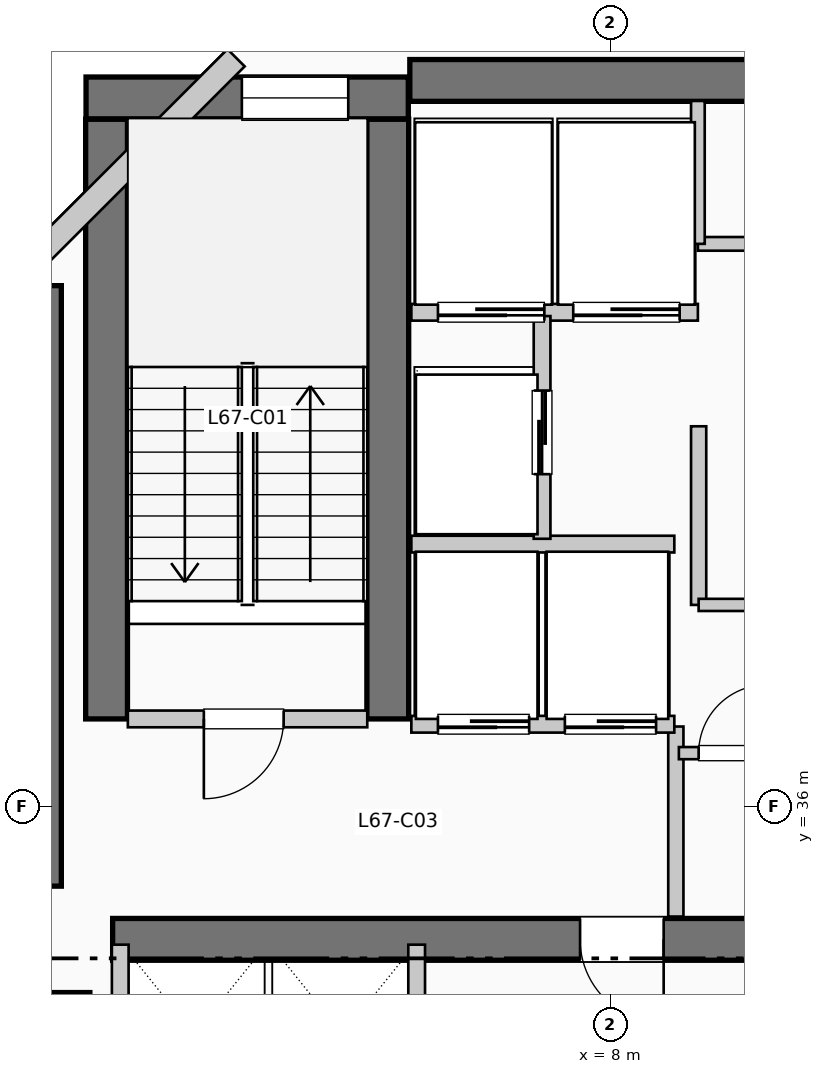
"""IFC4 building model, lengths in metres.
Left out: names, types, materials, properties, quantities, classifications, styles, units other than length and angle.
Written with IfcOpenShell. Run it as: python <this file> out.ifc"""

import sys

from ifc_helpers import new_model, si_unit, direction, frame, frame_2d, origin, origin_2d, place, context, subcontext, project, spatial, rectangle, extrude, element, fill, save


model = new_model("IFC4")
c1 = context("Model", 3, precision=1e-05, world=origin(), true_north=direction((0.0, 1.0)))
c2 = subcontext(c1, "Body", "Model", "MODEL_VIEW")
j1 = project(units=[si_unit("LENGTHUNIT", "METRE"), si_unit("PLANEANGLEUNIT", "RADIAN")], contexts=[c1])
p1 = place(None, origin())
s1 = spatial("IfcSite", under=j1, at=p1, CompositionType="ELEMENT")
p2 = place(p1, origin())
s2 = spatial("IfcBuilding", under=s1, at=p2, CompositionType="ELEMENT")
p3 = place(p2, frame((0.0, 0.0, 276.21)))
s3 = spatial("IfcBuildingStorey", under=s2, at=p3, CompositionType="ELEMENT", Elevation=276.21)
p4 = place(p3, frame((5.36, 45.55, 0.0), z_axis=(0.0, 0.0, 1.0), x_axis=(1.0, 0.0, 0.0)))
e1 = element("IfcWall", 1, at=p4, inside=s3, PredefinedType="SHEAR", context=c2, shape_type="SweptSolid", body=[
    extrude(rectangle(XDim=13.98, YDim=0.55, at=frame_2d((6.99, 0.0))), origin(), (0.0, 0.0, 1.0), 3.96),
])
p5 = place(p3, frame((0.5, 34.95, 0.0), z_axis=(0.0, 0.0, 1.0), x_axis=(0.0, 1.0, 0.0)))
e2 = element("IfcWall", 2, at=p5, inside=s3, PredefinedType="SHEAR", context=c2, shape_type="SweptSolid", body=[
    extrude(rectangle(XDim=7.9, YDim=0.55, at=frame_2d((3.95, 0.0))), origin(), (0.0, 0.0, 1.0), 3.96),
])
p6 = place(p3, frame((1.45, 34.25, 0.0), z_axis=(0.0, 0.0, 1.0), x_axis=(1.0, 0.0, 0.0)))
e3 = element("IfcWall", 3, at=p6, inside=s3, PredefinedType="SHEAR", context=c2, shape_type="SweptSolid", body=[
    extrude(rectangle(XDim=10.71, YDim=0.55, at=frame_2d((5.355, 0.0))), origin(), (0.0, 0.0, 1.0), 3.96),
])
p7 = place(p6, frame((7.25, 0.0, 0.0), z_axis=(0.0, 0.0, 1.0), x_axis=(-1.0, 0.0, 0.0)))
e4 = element("IfcOpeningElement", 4, at=p7, cuts=e3, PredefinedType="OPENING", context=c2, shape_type="SweptSolid", body=[
    extrude(rectangle(XDim=1.1, YDim=2.15, at=frame_2d((0.55, 1.075))), frame((0.0, 0.285, 0.0), z_axis=(0.0, -1.0, 0.0), x_axis=(1.0, 0.0, 0.0)), (0.0, 0.0, 1.0), 0.57),
])
for number, where, z_axis, x_axis in (
    (5, (1.37, 37.15, 0.0), (0.0, 0.0, 1.0), (0.0, 1.0, 0.0)),
    (6, (5.07, 37.15, 0.0), (0.0, 0.0, 1.0), (0.0, 1.0, 0.0)),
):
    element("IfcWall", number, at=place(p3, frame(where, z_axis=z_axis, x_axis=x_axis)), inside=s3, PredefinedType="SHEAR", context=c2, shape_type="SweptSolid", body=[
        extrude(rectangle(XDim=7.89, YDim=0.55, at=frame_2d((3.945, 0.0))), origin(), (0.0, 0.0, 1.0), 3.96),
    ])
p8 = place(p3, frame((1.1, 45.32, 0.0), z_axis=(0.0, 0.0, 1.0), x_axis=(1.0, 0.0, 0.0)))
e7 = element("IfcWall", 7, at=p8, inside=s3, PredefinedType="SHEAR", context=c2, shape_type="SweptSolid", body=[
    extrude(rectangle(XDim=4.24, YDim=0.55, at=frame_2d((2.12, 0.0))), origin(), (0.0, 0.0, 1.0), 3.96),
])
p9 = place(p8, frame((2.05, 0.0, 1.05)))
e8 = element("IfcOpeningElement", 8, at=p9, cuts=e7, PredefinedType="OPENING", context=c2, shape_type="SweptSolid", body=[
    extrude(rectangle(XDim=1.4, YDim=1.8, at=frame_2d((0.7, 0.9))), frame((0.0, 0.285, 0.0), z_axis=(0.0, -1.0, 0.0), x_axis=(1.0, 0.0, 0.0)), (0.0, 0.0, 1.0), 0.57),
])
p10 = place(p3, frame((0.8, 33.2, 0.0), z_axis=(0.0, 0.0, 1.0), x_axis=(1.0, 0.0, 0.0)))
e9 = element("IfcColumn", 9, at=p10, inside=s3, PredefinedType="COLUMN", context=c2, shape_type="SweptSolid", body=[
    extrude(rectangle(XDim=0.7, YDim=0.7, at=origin_2d()), origin(), (0.0, 0.0, 1.0), 3.96),
])
p11 = place(p3, frame((3.074, 45.848, 0.0), z_axis=(0.0, 0.0, 1.0), x_axis=(-0.707106781187, -0.707106781187, 0.0)))
e10 = element("IfcWall", 10, at=p11, inside=s3, PredefinedType="SOLIDWALL", context=c2, shape_type="SweptSolid", body=[
    extrude(rectangle(XDim=4.133, YDim=0.32, at=frame_2d((2.066, 0.0))), origin(), (0.0, 0.0, 1.0), 3.74),
])
p12 = place(p3, frame((1.65, 37.15, 0.0), z_axis=(0.0, 0.0, 1.0), x_axis=(1.0, 0.0, 0.0)))
e11 = element("IfcWall", 11, at=p12, inside=s3, PredefinedType="PARTITIONING", context=c2, shape_type="SweptSolid", body=[
    extrude(rectangle(XDim=3.15, YDim=0.22, at=frame_2d((1.575, 0.0))), origin(), (0.0, 0.0, 1.0), 3.74),
])
p13 = place(p12, frame((2.05, 0.0, 0.0), z_axis=(0.0, 0.0, 1.0), x_axis=(-1.0, 0.0, 0.0)))
e12 = element("IfcOpeningElement", 12, at=p13, cuts=e11, PredefinedType="OPENING", context=c2, shape_type="SweptSolid", body=[
    extrude(rectangle(XDim=1.05, YDim=2.15, at=frame_2d((0.525, 1.075))), frame((0.0, 0.12, 0.0), z_axis=(0.0, -1.0, 0.0), x_axis=(1.0, 0.0, 0.0)), (0.0, 0.0, 1.0), 0.24),
])
p14 = place(p3, frame((8.86, 34.55, 0.0), z_axis=(0.0, 0.0, 1.0), x_axis=(0.0, 1.0, 0.0)))
e13 = element("IfcWall", 13, at=p14, inside=s3, PredefinedType="PARTITIONING", context=c2, shape_type="SweptSolid", body=[
    extrude(rectangle(XDim=2.5, YDim=0.2, at=frame_2d((1.25, 0.0))), origin(), (0.0, 0.0, 1.0), 3.74),
])
p15 = place(p3, frame((5.38, 37.08, 0.0), z_axis=(0.0, 0.0, 1.0), x_axis=(1.0, 0.0, 0.0)))
e14 = element("IfcWall", 14, at=p15, inside=s3, PredefinedType="PARTITIONING", context=c2, shape_type="SweptSolid", body=[
    extrude(rectangle(XDim=3.46, YDim=0.22, at=frame_2d((1.73, 0.0))), origin(), (0.0, 0.0, 1.0), 3.74),
])
p16 = place(p15, frame((1.55, 0.0, 0.0), z_axis=(0.0, 0.0, 1.0), x_axis=(-1.0, 0.0, 0.0)))
e15 = element("IfcOpeningElement", 15, at=p16, cuts=e14, PredefinedType="OPENING", context=c2, shape_type="SweptSolid", body=[
    extrude(rectangle(XDim=1.2, YDim=2.2, at=frame_2d((0.6, 1.1))), frame((0.0, 0.12, 0.0), z_axis=(0.0, -1.0, 0.0), x_axis=(1.0, 0.0, 0.0)), (0.0, 0.0, 1.0), 0.24),
])
p17 = place(p15, frame((3.22, 0.0, 0.0), z_axis=(0.0, 0.0, 1.0), x_axis=(-1.0, 0.0, 0.0)))
e16 = element("IfcOpeningElement", 16, at=p17, cuts=e14, PredefinedType="OPENING", context=c2, shape_type="SweptSolid", body=[
    extrude(rectangle(XDim=1.2, YDim=2.2, at=frame_2d((0.6, 1.1))), frame((0.0, 0.12, 0.0), z_axis=(0.0, -1.0, 0.0), x_axis=(1.0, 0.0, 0.0)), (0.0, 0.0, 1.0), 0.24),
])
p18 = place(p3, frame((5.38, 39.45, 0.0), z_axis=(0.0, 0.0, 1.0), x_axis=(1.0, 0.0, 0.0)))
e17 = element("IfcWall", 17, at=p18, inside=s3, PredefinedType="PARTITIONING", context=c2, shape_type="SweptSolid", body=[
    extrude(rectangle(XDim=3.46, YDim=0.22, at=frame_2d((1.73, 0.0))), origin(), (0.0, 0.0, 1.0), 3.74),
])
p19 = place(p3, frame((5.38, 42.5, 0.0), z_axis=(0.0, 0.0, 1.0), x_axis=(1.0, 0.0, 0.0)))
e18 = element("IfcWall", 18, at=p19, inside=s3, PredefinedType="PARTITIONING", context=c2, shape_type="SweptSolid", body=[
    extrude(rectangle(XDim=3.77, YDim=0.22, at=frame_2d((1.885, 0.0))), origin(), (0.0, 0.0, 1.0), 3.74),
])
p20 = place(p19, frame((1.75, 0.0, 0.0), z_axis=(0.0, 0.0, 1.0), x_axis=(-1.0, 0.0, 0.0)))
e19 = element("IfcOpeningElement", 19, at=p20, cuts=e18, PredefinedType="OPENING", context=c2, shape_type="SweptSolid", body=[
    extrude(rectangle(XDim=1.4, YDim=2.2, at=frame_2d((0.7, 1.1))), frame((0.0, 0.12, 0.0), z_axis=(0.0, -1.0, 0.0), x_axis=(1.0, 0.0, 0.0)), (0.0, 0.0, 1.0), 0.24),
])
p21 = place(p19, frame((3.53, 0.0, 0.0), z_axis=(0.0, 0.0, 1.0), x_axis=(-1.0, 0.0, 0.0)))
e20 = element("IfcOpeningElement", 20, at=p21, cuts=e18, PredefinedType="OPENING", context=c2, shape_type="SweptSolid", body=[
    extrude(rectangle(XDim=1.4, YDim=2.2, at=frame_2d((0.7, 1.1))), frame((0.0, 0.12, 0.0), z_axis=(0.0, -1.0, 0.0), x_axis=(1.0, 0.0, 0.0)), (0.0, 0.0, 1.0), 0.24),
])
p22 = place(p3, frame((7.1, 39.52, 0.0), z_axis=(0.0, 0.0, 1.0), x_axis=(0.0, 1.0, 0.0)))
e21 = element("IfcWall", 21, at=p22, inside=s3, PredefinedType="PARTITIONING", context=c2, shape_type="SweptSolid", body=[
    extrude(rectangle(XDim=2.93, YDim=0.22, at=frame_2d((1.465, 0.0))), origin(), (0.0, 0.0, 1.0), 3.74),
])
p23 = place(p22, frame((0.85, 0.0, 0.0)))
e22 = element("IfcOpeningElement", 22, at=p23, cuts=e21, PredefinedType="OPENING", context=c2, shape_type="SweptSolid", body=[
    extrude(rectangle(XDim=1.1, YDim=2.2, at=frame_2d((0.55, 1.1))), frame((0.0, 0.12, 0.0), z_axis=(0.0, -1.0, 0.0), x_axis=(1.0, 0.0, 0.0)), (0.0, 0.0, 1.0), 0.24),
])
for number, where, z_axis, x_axis in (
    (23, (1.55, 31.8, 0.0), (0.0, 0.0, 1.0), (0.0, 1.0, 0.0)),
    (24, (5.45, 31.8, 0.0), (0.0, 0.0, 1.0), (0.0, 1.0, 0.0)),
):
    element("IfcWall", number, at=place(p3, frame(where, z_axis=z_axis, x_axis=x_axis)), inside=s3, PredefinedType="PARTITIONING", context=c2, shape_type="SweptSolid", body=[
        extrude(rectangle(XDim=2.38, YDim=0.22, at=frame_2d((1.19, 0.0))), origin(), (0.0, 0.0, 1.0), 3.74),
    ])
p24 = place(p3, frame((9.16, 38.65, 0.0), z_axis=(0.0, 0.0, 1.0), x_axis=(0.0, 1.0, 0.0)))
e25 = element("IfcWall", 25, at=p24, inside=s3, PredefinedType="PARTITIONING", context=c2, shape_type="SweptSolid", body=[
    extrude(rectangle(XDim=2.35, YDim=0.2, at=frame_2d((1.175, 0.0))), origin(), (0.0, 0.0, 1.0), 3.74),
])
p25 = place(p3, frame((8.9, 36.7, 0.0), z_axis=(0.0, 0.0, 1.0), x_axis=(1.0, 0.0, 0.0)))
e26 = element("IfcWall", 26, at=p25, inside=s3, PredefinedType="PARTITIONING", context=c2, shape_type="SweptSolid", body=[
    extrude(rectangle(XDim=3.25, YDim=0.16, at=frame_2d((1.625, 0.0))), origin(), (0.0, 0.0, 1.0), 3.74),
])
p26 = place(p25, frame((0.26, 0.0, 0.0)))
e27 = element("IfcOpeningElement", 27, at=p26, cuts=e26, PredefinedType="OPENING", context=c2, shape_type="SweptSolid", body=[
    extrude(rectangle(XDim=0.9, YDim=2.15, at=frame_2d((0.45, 1.075))), frame((0.0, 0.09, 0.0), z_axis=(0.0, -1.0, 0.0), x_axis=(1.0, 0.0, 0.0)), (0.0, 0.0, 1.0), 0.18),
])
p27 = place(p25, frame((1.68, 0.0, 0.0)))
e28 = element("IfcOpeningElement", 28, at=p27, cuts=e26, PredefinedType="OPENING", context=c2, shape_type="SweptSolid", body=[
    extrude(rectangle(XDim=0.9, YDim=2.15, at=frame_2d((0.45, 1.075))), frame((0.0, 0.09, 0.0), z_axis=(0.0, -1.0, 0.0), x_axis=(1.0, 0.0, 0.0)), (0.0, 0.0, 1.0), 0.18),
])
p28 = place(p3, frame((9.16, 38.65, 0.0), z_axis=(0.0, 0.0, 1.0), x_axis=(1.0, 0.0, 0.0)))
e29 = element("IfcWall", 29, at=p28, inside=s3, PredefinedType="PARTITIONING", context=c2, shape_type="SweptSolid", body=[
    extrude(rectangle(XDim=3.42, YDim=0.16, at=frame_2d((1.71, 0.0))), origin(), (0.0, 0.0, 1.0), 3.74),
])
p29 = place(p28, frame((2.15, 0.0, 0.0), z_axis=(0.0, 0.0, 1.0), x_axis=(-1.0, 0.0, 0.0)))
e30 = element("IfcOpeningElement", 30, at=p29, cuts=e29, PredefinedType="OPENING", context=c2, shape_type="SweptSolid", body=[
    extrude(rectangle(XDim=0.95, YDim=2.15, at=frame_2d((0.475, 1.075))), frame((0.0, 0.09, 0.0), z_axis=(0.0, -1.0, 0.0), x_axis=(1.0, 0.0, 0.0)), (0.0, 0.0, 1.0), 0.18),
])
p30 = place(p3, frame((9.15, 43.4, 0.0), z_axis=(0.0, 0.0, 1.0), x_axis=(1.0, 0.0, 0.0)))
e31 = element("IfcWall", 31, at=p30, inside=s3, PredefinedType="PLUMBINGWALL", context=c2, shape_type="SweptSolid", body=[
    extrude(rectangle(XDim=9.33, YDim=0.18, at=frame_2d((4.665, 0.0))), origin(), (0.0, 0.0, 1.0), 3.74),
])
p31 = place(p30, frame((1.88, 0.0, 0.0)))
e32 = element("IfcOpeningElement", 32, at=p31, cuts=e31, PredefinedType="OPENING", context=c2, shape_type="SweptSolid", body=[
    extrude(rectangle(XDim=0.92, YDim=2.1, at=frame_2d((0.46, 1.05))), frame((0.0, 0.1, 0.0), z_axis=(0.0, -1.0, 0.0), x_axis=(1.0, 0.0, 0.0)), (0.0, 0.0, 1.0), 0.2),
])
p32 = place(p30, frame((6.515, 0.0, 0.0)))
e33 = element("IfcOpeningElement", 33, at=p32, cuts=e31, PredefinedType="OPENING", context=c2, shape_type="SweptSolid", body=[
    extrude(rectangle(XDim=0.92, YDim=2.1, at=frame_2d((0.46, 1.05))), frame((0.0, 0.1, 0.0), z_axis=(0.0, -1.0, 0.0), x_axis=(1.0, 0.0, 0.0)), (0.0, 0.0, 1.0), 0.2),
])
p33 = place(p3, frame((9.15, 43.4, 0.0), z_axis=(0.0, 0.0, 1.0), x_axis=(0.0, 1.0, 0.0)))
e34 = element("IfcWall", 34, at=p33, inside=s3, PredefinedType="PLUMBINGWALL", context=c2, shape_type="SweptSolid", body=[
    extrude(rectangle(XDim=1.88, YDim=0.18, at=frame_2d((0.94, 0.0))), origin(), (0.0, 0.0, 1.0), 3.74),
])
p34 = place(p9, origin())
e35 = element("IfcWindow", 35, at=p34, inside=s3, PartitioningType="SINGLE_PANEL", PredefinedType="WINDOW", context=c2, shape_type="SweptSolid", body=[
    extrude(rectangle(XDim=1.4, YDim=1.8, at=frame_2d((0.7, 0.9))), frame((0.0, 0.03, 0.0), z_axis=(0.0, -1.0, 0.0), x_axis=(1.0, 0.0, 0.0)), (0.0, 0.0, 1.0), 0.06),
])
fill(e8, e35)
p35 = place(p13, origin())
e36 = element("IfcDoor", 36, at=p35, inside=s3, OperationType="SINGLE_SWING_LEFT", PredefinedType="DOOR", context=c2, shape_type="SweptSolid", body=[
    extrude(rectangle(XDim=1.05, YDim=2.15, at=frame_2d((0.525, 1.075))), frame((0.0, 0.025, 0.0), z_axis=(0.0, -1.0, 0.0), x_axis=(1.0, 0.0, 0.0)), (0.0, 0.0, 1.0), 0.05),
])
fill(e12, e36)
p36 = place(p7, origin())
e37 = element("IfcDoor", 37, at=p36, inside=s3, OperationType="SINGLE_SWING_RIGHT", PredefinedType="DOOR", context=c2, shape_type="SweptSolid", body=[
    extrude(rectangle(XDim=1.1, YDim=2.15, at=frame_2d((0.55, 1.075))), frame((0.0, 0.025, 0.0), z_axis=(0.0, -1.0, 0.0), x_axis=(1.0, 0.0, 0.0)), (0.0, 0.0, 1.0), 0.05),
])
fill(e4, e37)
p37 = place(p16, origin())
e38 = element("IfcDoor", 38, at=p37, inside=s3, OperationType="SLIDING_TO_RIGHT", PredefinedType="DOOR", context=c2, shape_type="SweptSolid", body=[
    extrude(rectangle(XDim=1.2, YDim=2.2, at=frame_2d((0.6, 1.1))), frame((0.0, 0.025, 0.0), z_axis=(0.0, -1.0, 0.0), x_axis=(1.0, 0.0, 0.0)), (0.0, 0.0, 1.0), 0.05),
])
fill(e15, e38)
p38 = place(p17, origin())
e39 = element("IfcDoor", 39, at=p38, inside=s3, OperationType="SLIDING_TO_RIGHT", PredefinedType="DOOR", context=c2, shape_type="SweptSolid", body=[
    extrude(rectangle(XDim=1.2, YDim=2.2, at=frame_2d((0.6, 1.1))), frame((0.0, 0.025, 0.0), z_axis=(0.0, -1.0, 0.0), x_axis=(1.0, 0.0, 0.0)), (0.0, 0.0, 1.0), 0.05),
])
fill(e16, e39)
p39 = place(p20, origin())
e40 = element("IfcDoor", 40, at=p39, inside=s3, OperationType="SLIDING_TO_LEFT", PredefinedType="DOOR", context=c2, shape_type="SweptSolid", body=[
    extrude(rectangle(XDim=1.4, YDim=2.2, at=frame_2d((0.7, 1.1))), frame((0.0, 0.025, 0.0), z_axis=(0.0, -1.0, 0.0), x_axis=(1.0, 0.0, 0.0)), (0.0, 0.0, 1.0), 0.05),
])
fill(e19, e40)
p40 = place(p21, origin())
e41 = element("IfcDoor", 41, at=p40, inside=s3, OperationType="SLIDING_TO_LEFT", PredefinedType="DOOR", context=c2, shape_type="SweptSolid", body=[
    extrude(rectangle(XDim=1.4, YDim=2.2, at=frame_2d((0.7, 1.1))), frame((0.0, 0.025, 0.0), z_axis=(0.0, -1.0, 0.0), x_axis=(1.0, 0.0, 0.0)), (0.0, 0.0, 1.0), 0.05),
])
fill(e20, e41)
p41 = place(p23, origin())
e42 = element("IfcDoor", 42, at=p41, inside=s3, OperationType="SLIDING_TO_LEFT", PredefinedType="DOOR", context=c2, shape_type="SweptSolid", body=[
    extrude(rectangle(XDim=1.1, YDim=2.2, at=frame_2d((0.55, 1.1))), frame((0.0, 0.025, 0.0), z_axis=(0.0, -1.0, 0.0), x_axis=(1.0, 0.0, 0.0)), (0.0, 0.0, 1.0), 0.05),
])
fill(e22, e42)
p42 = place(p26, origin())
e43 = element("IfcDoor", 43, at=p42, inside=s3, OperationType="SINGLE_SWING_RIGHT", PredefinedType="DOOR", context=c2, shape_type="SweptSolid", body=[
    extrude(rectangle(XDim=0.9, YDim=2.15, at=frame_2d((0.45, 1.075))), frame((0.0, 0.025, 0.0), z_axis=(0.0, -1.0, 0.0), x_axis=(1.0, 0.0, 0.0)), (0.0, 0.0, 1.0), 0.05),
])
fill(e27, e43)
save(model, sys.argv[1])
